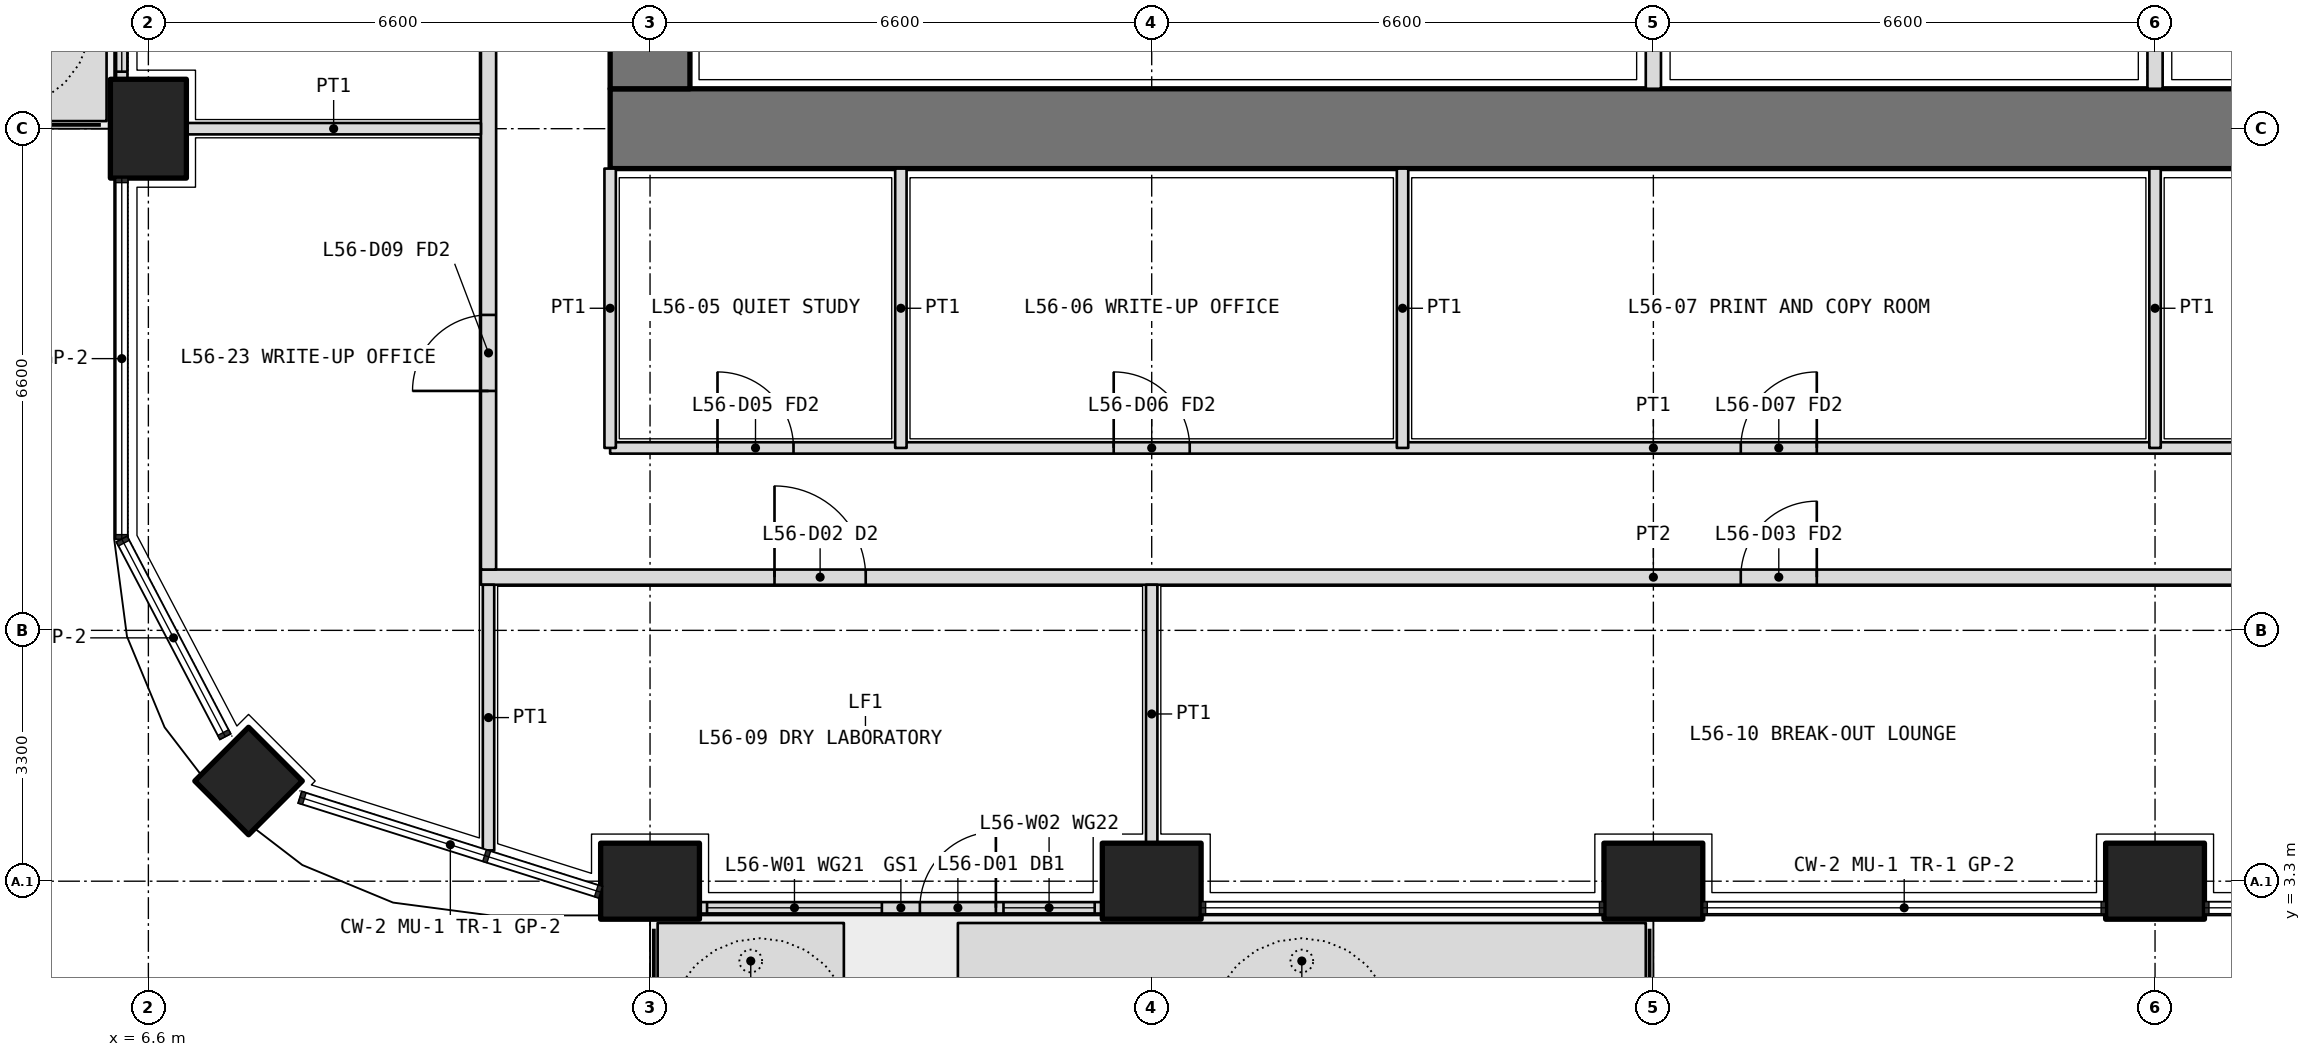
"""IFC4 building model, lengths in metres.
Left out: names, types, materials, properties, quantities, classifications, styles, units other than length and angle.
Written with IfcOpenShell. Run it as: python <this file> out.ifc"""

import sys

from ifc_helpers import new_model, si_unit, direction, frame, frame_2d, origin, origin_2d, place, context, subcontext, project, spatial, polyline, rectangle, outline, extrude, element, fill, save


model = new_model("IFC4")
c1 = context("Model", 3, precision=1e-05, world=origin(), true_north=direction((0.0, 1.0)))
c2 = subcontext(c1, "Body", "Model", "MODEL_VIEW")
j1 = project(units=[si_unit("LENGTHUNIT", "METRE"), si_unit("PLANEANGLEUNIT", "RADIAN")], contexts=[c1])
p1 = place(None, origin())
s1 = spatial("IfcSite", under=j1, at=p1, CompositionType="ELEMENT")
p2 = place(p1, origin())
s2 = spatial("IfcBuilding", under=s1, at=p2, CompositionType="ELEMENT")
p3 = place(p2, frame((0.0, 0.0, 246.0)))
s3 = spatial("IfcBuildingStorey", under=s2, at=p3, CompositionType="ELEMENT", Elevation=246.0)
p4 = place(p3, frame((7.918, 4.618, 0.0), z_axis=(0.0, 0.0, 1.0), x_axis=(0.707106781187, 0.707106781187, 0.0)))
e1 = element("IfcColumn", 1, at=p4, inside=s3, PredefinedType="COLUMN", context=c2, shape_type="SweptSolid", body=[
    extrude(rectangle(XDim=1.0, YDim=1.0, at=origin_2d()), origin(), (0.0, 0.0, 1.0), 4.2),
])
for number, where, z_axis, x_axis in (
    (2, (13.2, 3.3, 0.0), (0.0, 0.0, 1.0), (1.0, 0.0, 0.0)),
    (3, (19.8, 3.3, 0.0), (0.0, 0.0, 1.0), (1.0, 0.0, 0.0)),
    (4, (26.4, 3.3, 0.0), (0.0, 0.0, 1.0), (1.0, 0.0, 0.0)),
    (5, (33.0, 3.3, 0.0), (0.0, 0.0, 1.0), (1.0, 0.0, 0.0)),
    (6, (6.6, 13.2, 0.0), (0.0, 0.0, 1.0), (0.0, 1.0, 0.0)),
):
    element("IfcColumn", number, at=place(p3, frame(where, z_axis=z_axis, x_axis=x_axis)), inside=s3, PredefinedType="COLUMN", context=c2, shape_type="SweptSolid", body=[
        extrude(rectangle(XDim=1.3, YDim=1.0, at=origin_2d()), origin(), (0.0, 0.0, 1.0), 4.2),
    ])
p5 = place(p3, origin())
e7 = element("IfcWall", 7, at=p5, inside=s3, PredefinedType="USERDEFINED", context=c2, shape_type="SweptSolid", body=[
    extrude(outline(polyline([(13.3, 1.75), (15.75, 1.75), (15.75, 2.75), (13.3, 2.75), (13.3, 1.75)]), holes=[polyline([(13.45, 1.9), (15.6, 1.9), (15.6, 2.6), (13.45, 2.6), (13.45, 1.9)])]), origin(), (0.0, 0.0, 1.0), 1.05),
])
p6 = place(p3, origin())
e8 = element("IfcWall", 8, at=p6, inside=s3, PredefinedType="USERDEFINED", context=c2, shape_type="SweptSolid", body=[
    extrude(outline(polyline([(17.25, 1.75), (26.3, 1.75), (26.3, 2.75), (17.25, 2.75), (17.25, 1.75)]), holes=[polyline([(17.4, 1.9), (26.15, 1.9), (26.15, 2.6), (17.4, 2.6), (17.4, 1.9)])]), origin(), (0.0, 0.0, 1.0), 1.05),
])
p7 = place(p3, origin())
e9 = element("IfcWall", 9, at=p7, inside=s3, PredefinedType="USERDEFINED", context=c2, shape_type="SweptSolid", body=[
    extrude(outline(polyline([(5.05, 13.3), (6.05, 13.3), (6.05, 15.75), (5.05, 15.75), (5.05, 13.3)]), holes=[polyline([(5.2, 13.45), (5.9, 13.45), (5.9, 15.6), (5.2, 15.6), (5.2, 13.45)])]), origin(), (0.0, 0.0, 1.0), 1.05),
])
p8 = place(p3, frame((13.85, 2.95, 0.0), z_axis=(0.0, 0.0, 1.0), x_axis=(1.0, 0.0, 0.0)))
e10 = element("IfcWall", 10, at=p8, inside=s3, PredefinedType="SOLIDWALL", context=c2, shape_type="SweptSolid", body=[
    extrude(rectangle(XDim=5.3, YDim=0.15, at=frame_2d((2.65, 0.0))), origin(), (0.0, 0.0, 1.0), 2.7),
])
p9 = place(p8, frame((2.9, 0.0, 0.0)))
e11 = element("IfcOpeningElement", 11, at=p9, cuts=e10, PredefinedType="OPENING", context=c2, shape_type="SweptSolid", body=[
    extrude(rectangle(XDim=1.0, YDim=2.4, at=frame_2d((0.5, 1.2))), frame((0.0, 0.085, 0.0), z_axis=(0.0, -1.0, 0.0), x_axis=(1.0, 0.0, 0.0)), (0.0, 0.0, 1.0), 0.17),
])
p10 = place(p8, frame((0.1, 0.0, 0.1)))
e12 = element("IfcOpeningElement", 12, at=p10, cuts=e10, PredefinedType="OPENING", context=c2, shape_type="SweptSolid", body=[
    extrude(rectangle(XDim=2.3, YDim=2.3, at=frame_2d((1.15, 1.15))), frame((0.0, 0.085, 0.0), z_axis=(0.0, -1.0, 0.0), x_axis=(1.0, 0.0, 0.0)), (0.0, 0.0, 1.0), 0.17),
])
p11 = place(p8, frame((4.0, 0.0, 0.1)))
e13 = element("IfcOpeningElement", 13, at=p11, cuts=e10, PredefinedType="OPENING", context=c2, shape_type="SweptSolid", body=[
    extrude(rectangle(XDim=1.2, YDim=2.3, at=frame_2d((0.6, 1.15))), frame((0.0, 0.085, 0.0), z_axis=(0.0, -1.0, 0.0), x_axis=(1.0, 0.0, 0.0)), (0.0, 0.0, 1.0), 0.17),
])
p12 = place(p3, frame((6.25, 19.15, 0.0), z_axis=(0.0, 0.0, 1.0), x_axis=(0.0, -1.0, 0.0)))
e14 = element("IfcWall", 14, at=p12, inside=s3, PredefinedType="SOLIDWALL", context=c2, shape_type="SweptSolid", body=[
    extrude(rectangle(XDim=5.3, YDim=0.15, at=frame_2d((2.65, 0.0))), origin(), (0.0, 0.0, 1.0), 2.7),
])
p13 = place(p12, frame((1.4, 0.0, 0.0)))
e15 = element("IfcOpeningElement", 15, at=p13, cuts=e14, PredefinedType="OPENING", context=c2, shape_type="SweptSolid", body=[
    extrude(rectangle(XDim=1.0, YDim=2.4, at=frame_2d((0.5, 1.2))), frame((0.0, 0.085, 0.0), z_axis=(0.0, -1.0, 0.0), x_axis=(1.0, 0.0, 0.0)), (0.0, 0.0, 1.0), 0.17),
])
p14 = place(p12, frame((0.1, 0.0, 0.1)))
e16 = element("IfcOpeningElement", 16, at=p14, cuts=e14, PredefinedType="OPENING", context=c2, shape_type="SweptSolid", body=[
    extrude(rectangle(XDim=1.2, YDim=2.3, at=frame_2d((0.6, 1.15))), frame((0.0, 0.085, 0.0), z_axis=(0.0, -1.0, 0.0), x_axis=(1.0, 0.0, 0.0)), (0.0, 0.0, 1.0), 0.17),
])
p15 = place(p12, frame((2.9, 0.0, 0.1)))
e17 = element("IfcOpeningElement", 17, at=p15, cuts=e14, PredefinedType="OPENING", context=c2, shape_type="SweptSolid", body=[
    extrude(rectangle(XDim=2.3, YDim=2.3, at=frame_2d((1.15, 1.15))), frame((0.0, 0.085, 0.0), z_axis=(0.0, -1.0, 0.0), x_axis=(1.0, 0.0, 0.0)), (0.0, 0.0, 1.0), 0.17),
])
p16 = place(p3, frame((12.675, 13.2, 0.0), z_axis=(0.0, 0.0, 1.0), x_axis=(1.0, 0.0, 0.0)))
e18 = element("IfcWall", 18, at=p16, inside=s3, PredefinedType="SHEAR", context=c2, shape_type="SweptSolid", body=[
    extrude(rectangle(XDim=27.45, YDim=1.05, at=frame_2d((13.725, 0.0))), origin(), (0.0, 0.0, 1.0), 4.2),
])
p17 = place(p3, frame((13.2, 32.475, 0.0), z_axis=(0.0, 0.0, 1.0), x_axis=(0.0, -1.0, 0.0)))
e19 = element("IfcWall", 19, at=p17, inside=s3, PredefinedType="SHEAR", context=c2, shape_type="SweptSolid", body=[
    extrude(rectangle(XDim=18.75, YDim=1.05, at=frame_2d((9.375, 0.0))), origin(), (0.0, 0.0, 1.0), 4.2),
])
p18 = place(p17, frame((14.125, 0.0, 0.0)))
e20 = element("IfcOpeningElement", 20, at=p18, cuts=e19, PredefinedType="OPENING", context=c2, shape_type="SweptSolid", body=[
    extrude(rectangle(XDim=1.6, YDim=2.1, at=frame_2d((0.8, 1.05))), frame((0.0, 0.535, 0.0), z_axis=(0.0, -1.0, 0.0), x_axis=(1.0, 0.0, 0.0)), (0.0, 0.0, 1.0), 1.07),
])
p19 = place(p17, frame((3.325, 0.0, 0.0)))
e21 = element("IfcOpeningElement", 21, at=p19, cuts=e19, PredefinedType="OPENING", context=c2, shape_type="SweptSolid", body=[
    extrude(rectangle(XDim=1.6, YDim=2.1, at=frame_2d((0.8, 1.05))), frame((0.0, 0.535, 0.0), z_axis=(0.0, -1.0, 0.0), x_axis=(1.0, 0.0, 0.0)), (0.0, 0.0, 1.0), 1.07),
])
for number, where, z_axis, x_axis in (
    (22, (26.4, 13.725, 0.0), (0.0, 0.0, 1.0), (0.0, 1.0, 0.0)),
    (23, (33.0, 13.725, 0.0), (0.0, 0.0, 1.0), (0.0, 1.0, 0.0)),
):
    element("IfcWall", number, at=place(p3, frame(where, z_axis=z_axis, x_axis=x_axis)), inside=s3, PredefinedType="PARTITIONING", context=c2, shape_type="SweptSolid", body=[
        extrude(rectangle(XDim=1.975, YDim=0.2, at=frame_2d((0.987, 0.0))), origin(), (0.0, 0.0, 1.0), 4.2),
    ])
p20 = place(p3, frame((12.675, 9.0, 0.0), z_axis=(0.0, 0.0, 1.0), x_axis=(1.0, 0.0, 0.0)))
e24 = element("IfcWall", 24, at=p20, inside=s3, PredefinedType="PARTITIONING", context=c2, shape_type="SweptSolid", body=[
    extrude(rectangle(XDim=27.45, YDim=0.15, at=frame_2d((13.725, 0.0))), origin(), (0.0, 0.0, 1.0), 3.0),
])
p21 = place(p20, frame((1.413, 0.0, 0.0)))
e25 = element("IfcOpeningElement", 25, at=p21, cuts=e24, PredefinedType="OPENING", context=c2, shape_type="SweptSolid", body=[
    extrude(rectangle(XDim=1.0, YDim=2.1, at=frame_2d((0.5, 1.05))), frame((0.0, 0.085, 0.0), z_axis=(0.0, -1.0, 0.0), x_axis=(1.0, 0.0, 0.0)), (0.0, 0.0, 1.0), 0.17),
])
p22 = place(p20, frame((6.625, 0.0, 0.0)))
e26 = element("IfcOpeningElement", 26, at=p22, cuts=e24, PredefinedType="OPENING", context=c2, shape_type="SweptSolid", body=[
    extrude(rectangle(XDim=1.0, YDim=2.1, at=frame_2d((0.5, 1.05))), frame((0.0, 0.085, 0.0), z_axis=(0.0, -1.0, 0.0), x_axis=(1.0, 0.0, 0.0)), (0.0, 0.0, 1.0), 0.17),
])
p23 = place(p20, frame((14.875, 0.0, 0.0)))
e27 = element("IfcOpeningElement", 27, at=p23, cuts=e24, PredefinedType="OPENING", context=c2, shape_type="SweptSolid", body=[
    extrude(rectangle(XDim=1.0, YDim=2.1, at=frame_2d((0.5, 1.05))), frame((0.0, 0.085, 0.0), z_axis=(0.0, -1.0, 0.0), x_axis=(1.0, 0.0, 0.0)), (0.0, 0.0, 1.0), 0.17),
])
p24 = place(p20, frame((23.387, 0.0, 0.0)))
e28 = element("IfcOpeningElement", 28, at=p24, cuts=e24, PredefinedType="OPENING", context=c2, shape_type="SweptSolid", body=[
    extrude(rectangle(XDim=1.0, YDim=2.1, at=frame_2d((0.5, 1.05))), frame((0.0, 0.085, 0.0), z_axis=(0.0, -1.0, 0.0), x_axis=(1.0, 0.0, 0.0)), (0.0, 0.0, 1.0), 0.17),
])
p25 = place(p3, frame((12.675, 12.675, 0.0), z_axis=(0.0, 0.0, 1.0), x_axis=(0.0, -1.0, 0.0)))
e29 = element("IfcWall", 29, at=p25, inside=s3, PredefinedType="PARTITIONING", context=c2, shape_type="SweptSolid", body=[
    extrude(rectangle(XDim=3.675, YDim=0.15, at=frame_2d((1.837, 0.0))), origin(), (0.0, 0.0, 1.0), 3.0),
])
for number, where, z_axis, x_axis in (
    (30, (16.5, 12.675, 0.0), (0.0, 0.0, 1.0), (0.0, -1.0, 0.0)),
    (31, (23.1, 12.675, 0.0), (0.0, 0.0, 1.0), (0.0, -1.0, 0.0)),
):
    element("IfcWall", number, at=place(p3, frame(where, z_axis=z_axis, x_axis=x_axis)), inside=s3, PredefinedType="PARTITIONING", context=c2, shape_type="SweptSolid", body=[
        extrude(rectangle(XDim=3.675, YDim=0.15, at=frame_2d((1.837, 0.0))), origin(), (0.0, 0.0, 1.0), 3.9),
    ])
p26 = place(p3, frame((33.0, 12.675, 0.0), z_axis=(0.0, 0.0, 1.0), x_axis=(0.0, -1.0, 0.0)))
e32 = element("IfcWall", 32, at=p26, inside=s3, PredefinedType="PARTITIONING", context=c2, shape_type="SweptSolid", body=[
    extrude(rectangle(XDim=3.675, YDim=0.15, at=frame_2d((1.837, 0.0))), origin(), (0.0, 0.0, 1.0), 3.0),
])
p27 = place(p3, frame((10.975, 7.3, 0.0), z_axis=(0.0, 0.0, 1.0), x_axis=(1.0, 0.0, 0.0)))
e33 = element("IfcWall", 33, at=p27, inside=s3, PredefinedType="PARTITIONING", context=c2, shape_type="SweptSolid", body=[
    extrude(rectangle(XDim=30.85, YDim=0.2, at=frame_2d((15.425, 0.0))), origin(), (0.0, 0.0, 1.0), 3.0),
])
p28 = place(p27, frame((3.863, 0.0, 0.0)))
e34 = element("IfcOpeningElement", 34, at=p28, cuts=e33, PredefinedType="OPENING", context=c2, shape_type="SweptSolid", body=[
    extrude(rectangle(XDim=1.2, YDim=2.1, at=frame_2d((0.6, 1.05))), frame((0.0, 0.11, 0.0), z_axis=(0.0, -1.0, 0.0), x_axis=(1.0, 0.0, 0.0)), (0.0, 0.0, 1.0), 0.22),
])
p29 = place(p27, frame((16.575, 0.0, 0.0)))
e35 = element("IfcOpeningElement", 35, at=p29, cuts=e33, PredefinedType="OPENING", context=c2, shape_type="SweptSolid", body=[
    extrude(rectangle(XDim=1.0, YDim=2.1, at=frame_2d((0.5, 1.05))), frame((0.0, 0.11, 0.0), z_axis=(0.0, -1.0, 0.0), x_axis=(1.0, 0.0, 0.0)), (0.0, 0.0, 1.0), 0.22),
])
p30 = place(p27, frame((27.538, 0.0, 0.0)))
e36 = element("IfcOpeningElement", 36, at=p30, cuts=e33, PredefinedType="OPENING", context=c2, shape_type="SweptSolid", body=[
    extrude(rectangle(XDim=1.0, YDim=2.1, at=frame_2d((0.5, 1.05))), frame((0.0, 0.11, 0.0), z_axis=(0.0, -1.0, 0.0), x_axis=(1.0, 0.0, 0.0)), (0.0, 0.0, 1.0), 0.22),
])
p31 = place(p3, frame((11.075, 7.4, 0.0), z_axis=(0.0, 0.0, 1.0), x_axis=(0.0, 1.0, 0.0)))
e37 = element("IfcWall", 37, at=p31, inside=s3, PredefinedType="PARTITIONING", context=c2, shape_type="SweptSolid", body=[
    extrude(rectangle(XDim=31.4, YDim=0.2, at=frame_2d((15.7, 0.0))), origin(), (0.0, 0.0, 1.0), 3.0),
])
p32 = place(p31, frame((2.35, 0.0, 0.0)))
e38 = element("IfcOpeningElement", 38, at=p32, cuts=e37, PredefinedType="OPENING", context=c2, shape_type="SweptSolid", body=[
    extrude(rectangle(XDim=1.0, YDim=2.1, at=frame_2d((0.5, 1.05))), frame((0.0, 0.11, 0.0), z_axis=(0.0, -1.0, 0.0), x_axis=(1.0, 0.0, 0.0)), (0.0, 0.0, 1.0), 0.22),
])
p33 = place(p31, frame((6.9, 0.0, 0.0)))
e39 = element("IfcOpeningElement", 39, at=p33, cuts=e37, PredefinedType="OPENING", context=c2, shape_type="SweptSolid", body=[
    extrude(rectangle(XDim=1.0, YDim=2.1, at=frame_2d((0.5, 1.05))), frame((0.0, 0.11, 0.0), z_axis=(0.0, -1.0, 0.0), x_axis=(1.0, 0.0, 0.0)), (0.0, 0.0, 1.0), 0.22),
])
p34 = place(p31, frame((10.35, 0.0, 0.0)))
e40 = element("IfcOpeningElement", 40, at=p34, cuts=e37, PredefinedType="OPENING", context=c2, shape_type="SweptSolid", body=[
    extrude(rectangle(XDim=0.9, YDim=2.1, at=frame_2d((0.45, 1.05))), frame((0.0, 0.11, 0.0), z_axis=(0.0, -1.0, 0.0), x_axis=(1.0, 0.0, 0.0)), (0.0, 0.0, 1.0), 0.22),
])
p35 = place(p31, frame((13.7, 0.0, 0.0)))
e41 = element("IfcOpeningElement", 41, at=p35, cuts=e37, PredefinedType="OPENING", context=c2, shape_type="SweptSolid", body=[
    extrude(rectangle(XDim=0.9, YDim=2.1, at=frame_2d((0.45, 1.05))), frame((0.0, 0.11, 0.0), z_axis=(0.0, -1.0, 0.0), x_axis=(1.0, 0.0, 0.0)), (0.0, 0.0, 1.0), 0.22),
])
p36 = place(p31, frame((20.15, 0.0, 0.0)))
e42 = element("IfcOpeningElement", 42, at=p36, cuts=e37, PredefinedType="OPENING", context=c2, shape_type="SweptSolid", body=[
    extrude(rectangle(XDim=1.0, YDim=2.1, at=frame_2d((0.5, 1.05))), frame((0.0, 0.11, 0.0), z_axis=(0.0, -1.0, 0.0), x_axis=(1.0, 0.0, 0.0)), (0.0, 0.0, 1.0), 0.22),
])
p37 = place(p31, frame((28.05, 0.0, 0.0)))
e43 = element("IfcOpeningElement", 43, at=p37, cuts=e37, PredefinedType="OPENING", context=c2, shape_type="SweptSolid", body=[
    extrude(rectangle(XDim=1.0, YDim=2.1, at=frame_2d((0.5, 1.05))), frame((0.0, 0.11, 0.0), z_axis=(0.0, -1.0, 0.0), x_axis=(1.0, 0.0, 0.0)), (0.0, 0.0, 1.0), 0.22),
])
p38 = place(p3, frame((11.075, 3.705, 0.0), z_axis=(0.0, 0.0, 1.0), x_axis=(0.0, 1.0, 0.0)))
e44 = element("IfcWall", 44, at=p38, inside=s3, PredefinedType="PARTITIONING", context=c2, shape_type="SweptSolid", body=[
    extrude(rectangle(XDim=3.495, YDim=0.15, at=frame_2d((1.748, 0.0))), origin(), (0.0, 0.0, 1.0), 2.7),
])
p39 = place(p3, frame((19.8, 3.8, 0.0), z_axis=(0.0, 0.0, 1.0), x_axis=(0.0, 1.0, 0.0)))
e45 = element("IfcWall", 45, at=p39, inside=s3, PredefinedType="PARTITIONING", context=c2, shape_type="SweptSolid", body=[
    extrude(rectangle(XDim=3.4, YDim=0.15, at=frame_2d((1.7, 0.0))), origin(), (0.0, 0.0, 1.0), 3.0),
])
p40 = place(p3, frame((7.1, 13.2, 0.0), z_axis=(0.0, 0.0, 1.0), x_axis=(1.0, 0.0, 0.0)))
e46 = element("IfcWall", 46, at=p40, inside=s3, PredefinedType="PARTITIONING", context=c2, shape_type="SweptSolid", body=[
    extrude(rectangle(XDim=3.875, YDim=0.15, at=frame_2d((1.938, 0.0))), origin(), (0.0, 0.0, 1.0), 3.0),
])
p41 = place(p9, origin())
e47 = element("IfcDoor", 47, at=p41, inside=s3, OperationType="SINGLE_SWING_RIGHT", PredefinedType="DOOR", context=c2, shape_type="SweptSolid", body=[
    extrude(rectangle(XDim=1.0, YDim=2.4, at=frame_2d((0.5, 1.2))), frame((0.0, 0.025, 0.0), z_axis=(0.0, -1.0, 0.0), x_axis=(1.0, 0.0, 0.0)), (0.0, 0.0, 1.0), 0.05),
])
fill(e11, e47)
p42 = place(p10, origin())
e48 = element("IfcWindow", 48, at=p42, inside=s3, PartitioningType="SINGLE_PANEL", PredefinedType="WINDOW", context=c2, shape_type="SweptSolid", body=[
    extrude(rectangle(XDim=2.3, YDim=2.3, at=frame_2d((1.15, 1.15))), frame((0.0, 0.03, 0.0), z_axis=(0.0, -1.0, 0.0), x_axis=(1.0, 0.0, 0.0)), (0.0, 0.0, 1.0), 0.06),
])
fill(e12, e48)
p43 = place(p11, origin())
e49 = element("IfcWindow", 49, at=p43, inside=s3, PartitioningType="SINGLE_PANEL", PredefinedType="WINDOW", context=c2, shape_type="SweptSolid", body=[
    extrude(rectangle(XDim=1.2, YDim=2.3, at=frame_2d((0.6, 1.15))), frame((0.0, 0.03, 0.0), z_axis=(0.0, -1.0, 0.0), x_axis=(1.0, 0.0, 0.0)), (0.0, 0.0, 1.0), 0.06),
])
fill(e13, e49)
p44 = place(p15, origin())
e50 = element("IfcWindow", 50, at=p44, inside=s3, PartitioningType="SINGLE_PANEL", PredefinedType="WINDOW", context=c2, shape_type="SweptSolid", body=[
    extrude(rectangle(XDim=2.3, YDim=2.3, at=frame_2d((1.15, 1.15))), frame((0.0, 0.03, 0.0), z_axis=(0.0, -1.0, 0.0), x_axis=(1.0, 0.0, 0.0)), (0.0, 0.0, 1.0), 0.06),
])
fill(e17, e50)
p45 = place(p21, origin())
e51 = element("IfcDoor", 51, at=p45, inside=s3, OperationType="SINGLE_SWING_LEFT", PredefinedType="DOOR", context=c2, shape_type="SweptSolid", body=[
    extrude(rectangle(XDim=1.0, YDim=2.1, at=frame_2d((0.5, 1.05))), frame((0.0, 0.025, 0.0), z_axis=(0.0, -1.0, 0.0), x_axis=(1.0, 0.0, 0.0)), (0.0, 0.0, 1.0), 0.05),
])
fill(e25, e51)
p46 = place(p22, origin())
e52 = element("IfcDoor", 52, at=p46, inside=s3, OperationType="SINGLE_SWING_LEFT", PredefinedType="DOOR", context=c2, shape_type="SweptSolid", body=[
    extrude(rectangle(XDim=1.0, YDim=2.1, at=frame_2d((0.5, 1.05))), frame((0.0, 0.025, 0.0), z_axis=(0.0, -1.0, 0.0), x_axis=(1.0, 0.0, 0.0)), (0.0, 0.0, 1.0), 0.05),
])
fill(e26, e52)
p47 = place(p23, origin())
e53 = element("IfcDoor", 53, at=p47, inside=s3, OperationType="SINGLE_SWING_RIGHT", PredefinedType="DOOR", context=c2, shape_type="SweptSolid", body=[
    extrude(rectangle(XDim=1.0, YDim=2.1, at=frame_2d((0.5, 1.05))), frame((0.0, 0.025, 0.0), z_axis=(0.0, -1.0, 0.0), x_axis=(1.0, 0.0, 0.0)), (0.0, 0.0, 1.0), 0.05),
])
fill(e27, e53)
p48 = place(p28, origin())
e54 = element("IfcDoor", 54, at=p48, inside=s3, OperationType="DOUBLE_DOOR_SINGLE_SWING", PredefinedType="DOOR", context=c2, shape_type="SweptSolid", body=[
    extrude(rectangle(XDim=1.2, YDim=2.1, at=frame_2d((0.6, 1.05))), frame((0.0, 0.025, 0.0), z_axis=(0.0, -1.0, 0.0), x_axis=(1.0, 0.0, 0.0)), (0.0, 0.0, 1.0), 0.05),
])
fill(e34, e54)
p49 = place(p29, origin())
e55 = element("IfcDoor", 55, at=p49, inside=s3, OperationType="SINGLE_SWING_RIGHT", PredefinedType="DOOR", context=c2, shape_type="SweptSolid", body=[
    extrude(rectangle(XDim=1.0, YDim=2.1, at=frame_2d((0.5, 1.05))), frame((0.0, 0.025, 0.0), z_axis=(0.0, -1.0, 0.0), x_axis=(1.0, 0.0, 0.0)), (0.0, 0.0, 1.0), 0.05),
])
fill(e35, e55)
p50 = place(p32, origin())
e56 = element("IfcDoor", 56, at=p50, inside=s3, OperationType="SINGLE_SWING_LEFT", PredefinedType="DOOR", context=c2, shape_type="SweptSolid", body=[
    extrude(rectangle(XDim=1.0, YDim=2.1, at=frame_2d((0.5, 1.05))), frame((0.0, 0.025, 0.0), z_axis=(0.0, -1.0, 0.0), x_axis=(1.0, 0.0, 0.0)), (0.0, 0.0, 1.0), 0.05),
])
fill(e38, e56)
save(model, sys.argv[1])
